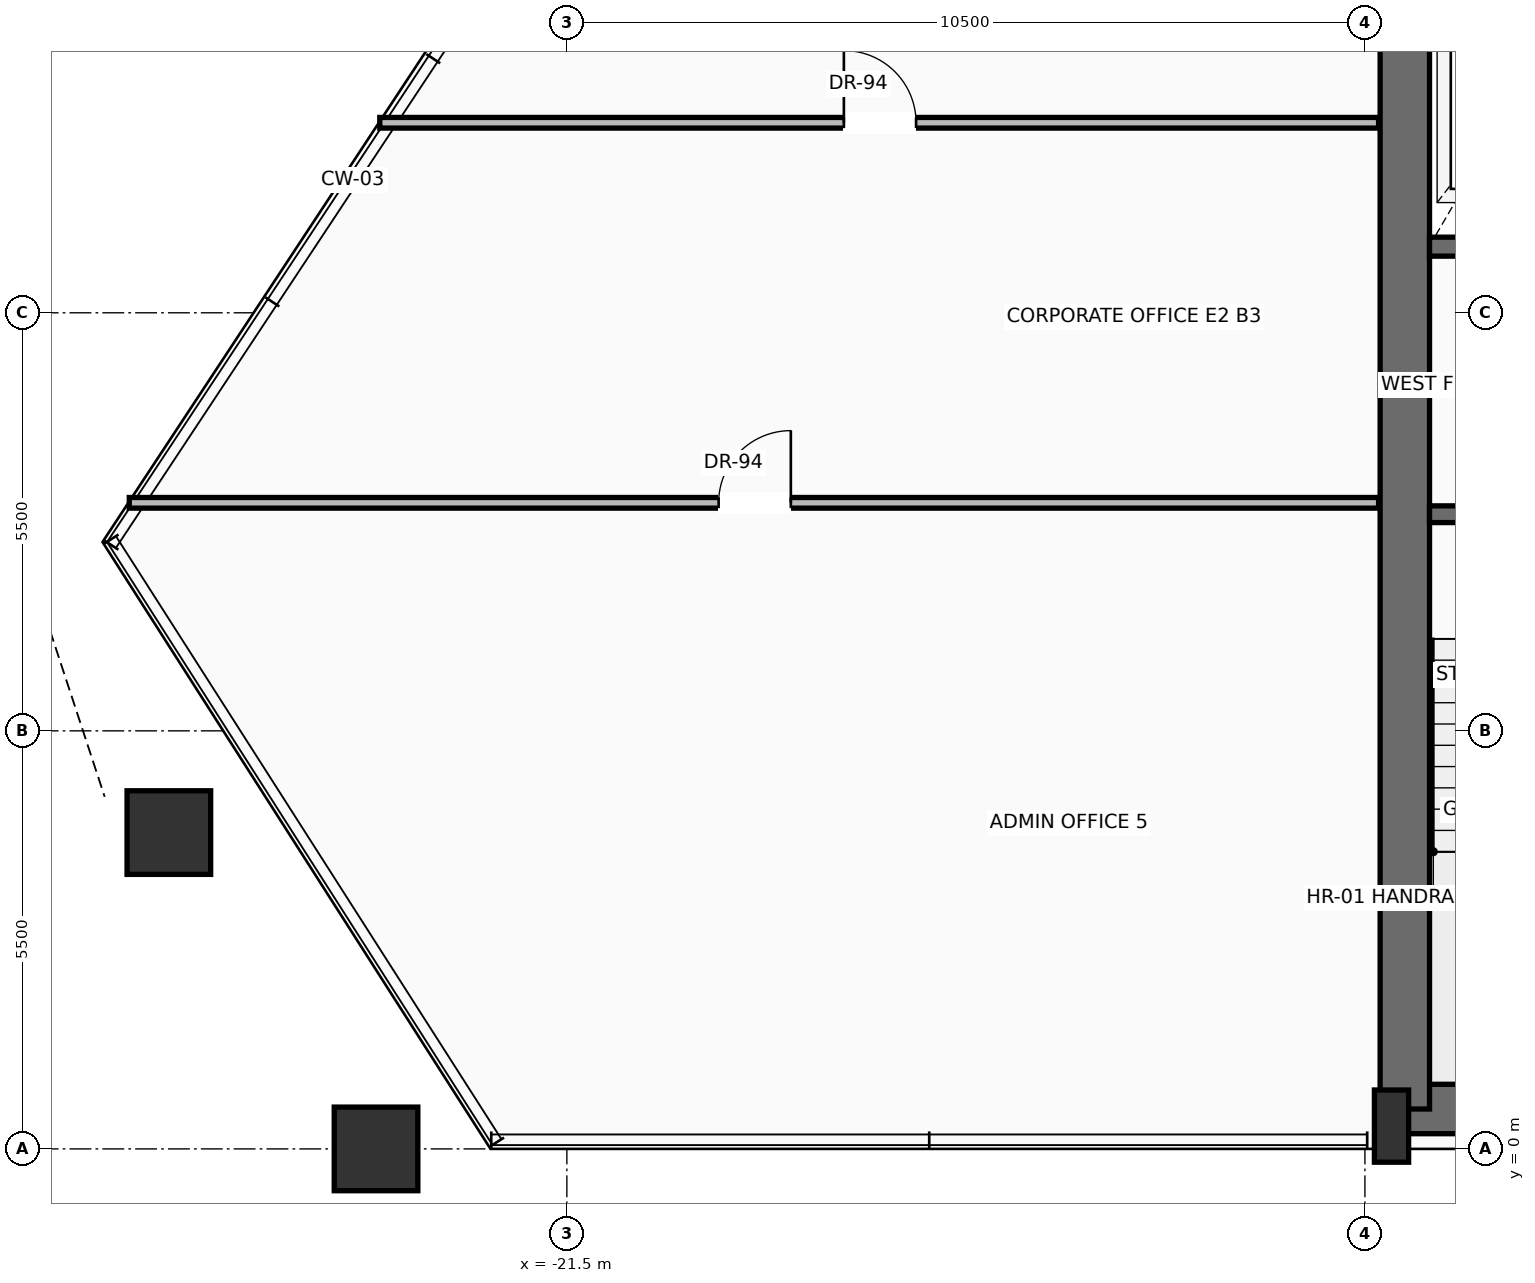
"""IFC4 building model, lengths in metres.
Left out: names, types, materials, properties, quantities, classifications, styles, units other than length and angle.
Written with IfcOpenShell. Run it as: python <this file> out.ifc"""

import sys

from ifc_helpers import new_model, si_unit, direction, frame, frame_2d, origin, origin_2d, place, context, subcontext, project, spatial, rectangle, hollow_rectangle, extrude, source, transform, mapped, element, fill, save


model = new_model("IFC4")
c1 = context("Model", 3, precision=1e-05, world=origin(), true_north=direction((0.0, 1.0)))
c2 = subcontext(c1, "Body", "Model", "MODEL_VIEW")
j1 = project(units=[si_unit("LENGTHUNIT", "METRE"), si_unit("PLANEANGLEUNIT", "RADIAN")], contexts=[c1])
p1 = place(None, origin())
s1 = spatial("IfcSite", under=j1, at=p1, CompositionType="ELEMENT")
p2 = place(p1, origin())
s2 = spatial("IfcBuilding", under=s1, at=p2, CompositionType="ELEMENT")
p3 = place(p2, frame((0.0, 0.0, 125.6)))
s3 = spatial("IfcBuildingStorey", under=s2, at=p3, CompositionType="ELEMENT", Elevation=125.6)
p4 = place(p3, frame((-10.65, 0.525, 0.0), z_axis=(0.0, 0.0, 1.0), x_axis=(1.0, 0.0, 0.0)))
e1 = element("IfcWall", 1, at=p4, inside=s3, PredefinedType="SHEAR", context=c2, shape_type="SweptSolid", body=[
    extrude(rectangle(XDim=21.3, YDim=0.65, at=frame_2d((10.65, 0.0))), origin(), (0.0, 0.0, 1.0), 3.47),
])
p5 = place(p3, frame((-10.475, 0.525, 0.0), z_axis=(0.0, 0.0, 1.0), x_axis=(0.0, 1.0, 0.0)))
e2 = element("IfcWall", 2, at=p5, inside=s3, PredefinedType="SHEAR", context=c2, shape_type="SweptSolid", body=[
    extrude(rectangle(XDim=15.55, YDim=0.65, at=frame_2d((7.775, 0.0))), origin(), (0.0, 0.0, 1.0), 3.47),
])
m1 = source(origin(), c2, "Body", "SweptSolid", [
    extrude(rectangle(XDim=0.45, YDim=0.95, at=origin_2d()), origin(), (0.0, 0.0, 1.0), 3.7),
])
p6 = place(p3, frame((-10.65, 0.3, 0.0), z_axis=(0.0, 0.0, 1.0), x_axis=(1.0, 0.0, 0.0)))
e3 = element("IfcColumn", 3, at=p6, inside=s3, PredefinedType="PILASTER", context=c2, shape_type="MappedRepresentation", body=[
    mapped(m1, transform((0.0, 0.0, 0.0), scale=1.0)),
])
m2 = source(origin(), c2, "Body", "SweptSolid", [
    extrude(hollow_rectangle(XDim=1.1, YDim=1.1, WallThickness=0.055, at=origin_2d()), origin(), (0.0, 0.0, 1.0), 3.691),
])
p7 = place(p3, frame((-24.011, 0.0, 0.004), z_axis=(-0.01190470564, 0.0, 0.999929136481), x_axis=(0.0, -1.0, 0.0)))
e4 = element("IfcColumn", 4, at=p7, inside=s3, PredefinedType="COLUMN", context=c2, shape_type="MappedRepresentation", body=[
    mapped(m2, transform((0.0, 0.0, 0.0), scale=1.0)),
])
m3 = source(origin(), c2, "Body", "SweptSolid", [
    extrude(hollow_rectangle(XDim=1.1, YDim=1.1, WallThickness=0.055, at=origin_2d()), origin(), (0.0, 0.0, 1.0), 3.692),
])
p8 = place(p3, frame((-26.737, 4.162, 0.004), z_axis=(-0.000661331013, -0.016334876017, 0.999866358303), x_axis=(0.999181454908, -0.040452690482, 0.0)))
e5 = element("IfcColumn", 5, at=p8, inside=s3, PredefinedType="COLUMN", context=c2, shape_type="MappedRepresentation", body=[
    mapped(m3, transform((0.0, 0.0, 0.0), scale=1.0)),
])
p9 = place(p3, frame((-5.5, 8.35, 0.0), z_axis=(0.0, 0.0, 1.0), x_axis=(-1.0, 0.0, 0.0)))
e6 = element("IfcWall", 6, at=p9, inside=s3, PredefinedType="SOLIDWALL", context=c2, shape_type="SweptSolid", body=[
    extrude(rectangle(XDim=4.65, YDim=0.22, at=frame_2d((2.325, 0.0))), origin(), (0.0, 0.0, 1.0), 3.47),
])
p10 = place(p9, frame((2.5, 0.0, 0.0)))
e7 = element("IfcOpeningElement", 7, at=p10, cuts=e6, PredefinedType="OPENING", context=c2, shape_type="SweptSolid", body=[
    extrude(rectangle(XDim=1.15, YDim=2.2, at=frame_2d((0.575, 1.1))), frame((0.0, 0.12, 0.0), z_axis=(0.0, -1.0, 0.0), x_axis=(1.0, 0.0, 0.0)), (0.0, 0.0, 1.0), 0.24),
])
p11 = place(p3, frame((-5.5, 11.87, 0.0), z_axis=(0.0, 0.0, 1.0), x_axis=(-1.0, 0.0, 0.0)))
e8 = element("IfcWall", 8, at=p11, inside=s3, PredefinedType="SOLIDWALL", context=c2, shape_type="SweptSolid", body=[
    extrude(rectangle(XDim=4.65, YDim=0.25, at=frame_2d((2.325, 0.0))), origin(), (0.0, 0.0, 1.0), 3.47),
])
p12 = place(p11, frame((2.95, 0.0, 0.0)))
e9 = element("IfcOpeningElement", 9, at=p12, cuts=e8, PredefinedType="OPENING", context=c2, shape_type="SweptSolid", body=[
    extrude(rectangle(XDim=1.2, YDim=2.25, at=frame_2d((0.6, 1.125))), frame((0.0, 0.135, 0.0), z_axis=(0.0, -1.0, 0.0), x_axis=(1.0, 0.0, 0.0)), (0.0, 0.0, 1.0), 0.27),
])
p13 = place(p3, frame((-27.258, 8.5, 0.0), z_axis=(0.0, 0.0, 1.0), x_axis=(1.0, 0.0, 0.0)))
e10 = element("IfcWall", 10, at=p13, inside=s3, PredefinedType="PARTITIONING", context=c2, shape_type="SweptSolid", body=[
    extrude(rectangle(XDim=16.438, YDim=0.14, at=frame_2d((8.219, 0.0))), origin(), (0.0, 0.0, 1.0), 3.462),
])
p14 = place(p13, frame((7.754, 0.0, 0.0)))
e11 = element("IfcOpeningElement", 11, at=p14, cuts=e10, PredefinedType="OPENING", context=c2, shape_type="SweptSolid", body=[
    extrude(rectangle(XDim=0.95, YDim=2.2, at=frame_2d((0.475, 1.1))), frame((0.0, 0.08, 0.0), z_axis=(0.0, -1.0, 0.0), x_axis=(1.0, 0.0, 0.0)), (0.0, 0.0, 1.0), 0.16),
])
p15 = place(p3, frame((-23.962, 13.5, 0.0), z_axis=(0.0, 0.0, 1.0), x_axis=(1.0, 0.0, 0.0)))
e12 = element("IfcWall", 12, at=p15, inside=s3, PredefinedType="PARTITIONING", context=c2, shape_type="SweptSolid", body=[
    extrude(rectangle(XDim=13.142, YDim=0.14, at=frame_2d((6.571, 0.0))), origin(), (0.0, 0.0, 1.0), 3.049),
])
p16 = place(p15, frame((6.106, 0.0, 0.0)))
e13 = element("IfcOpeningElement", 13, at=p16, cuts=e12, PredefinedType="OPENING", context=c2, shape_type="SweptSolid", body=[
    extrude(rectangle(XDim=0.95, YDim=2.2, at=frame_2d((0.475, 1.1))), frame((0.0, 0.08, 0.0), z_axis=(0.0, -1.0, 0.0), x_axis=(1.0, 0.0, 0.0)), (0.0, 0.0, 1.0), 0.16),
])
m4 = source(origin(), c2, "Body", "SweptSolid", [
    extrude(rectangle(XDim=0.95, YDim=2.2, at=frame_2d((0.475, 1.1))), frame((0.0, 0.025, 0.0), z_axis=(0.0, -1.0, 0.0), x_axis=(1.0, 0.0, 0.0)), (0.0, 0.0, 1.0), 0.05),
])
p17 = place(p16, origin())
e14 = element("IfcDoor", 14, at=p17, inside=s3, OperationType="SINGLE_SWING_LEFT", PredefinedType="DOOR", context=c2, shape_type="MappedRepresentation", body=[
    mapped(m4, transform((0.0, 0.0, 0.0), scale=1.0)),
])
fill(e13, e14)
p18 = place(p14, origin())
e15 = element("IfcDoor", 15, at=p18, inside=s3, OperationType="SINGLE_SWING_RIGHT", PredefinedType="DOOR", context=c2, shape_type="MappedRepresentation", body=[
    mapped(m4, transform((0.0, 0.0, 0.0), scale=1.0)),
])
fill(e11, e15)
save(model, sys.argv[1])
